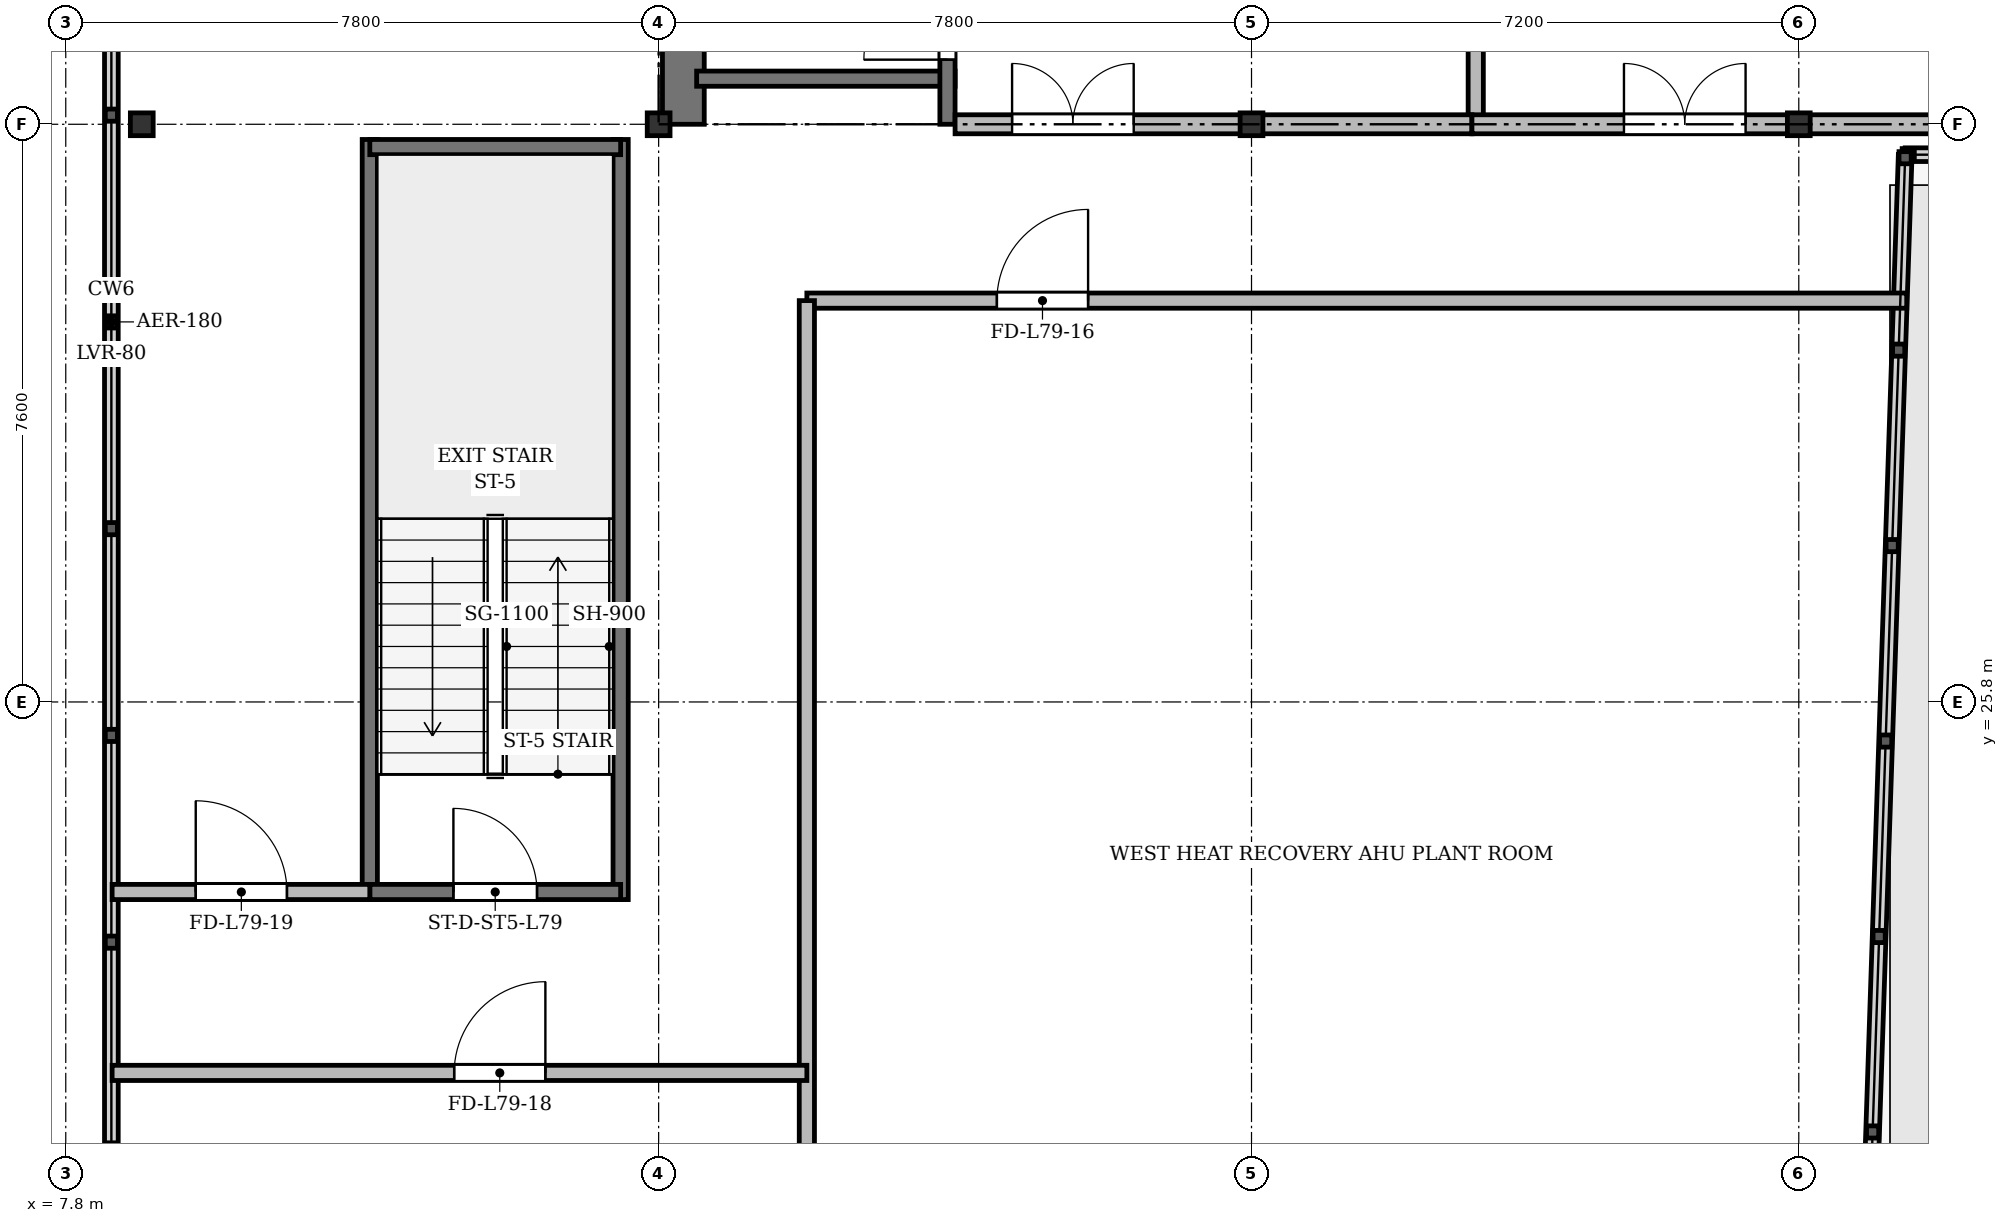
"""IFC4 building model, lengths in metres.
Left out: names, types, materials, properties, quantities, classifications, styles, units other than length and angle.
Written with IfcOpenShell. Run it as: python <this file> out.ifc"""

import sys

from ifc_helpers import new_model, si_unit, direction, frame, frame_2d, origin, origin_2d, place, context, subcontext, project, spatial, rectangle, i_section, extrude, source, transform, mapped, element, fill, save


model = new_model("IFC4")
c1 = context("Model", 3, precision=1e-05, world=origin(), true_north=direction((0.0, 1.0)))
c2 = subcontext(c1, "Body", "Model", "MODEL_VIEW")
j1 = project(units=[si_unit("LENGTHUNIT", "METRE"), si_unit("PLANEANGLEUNIT", "RADIAN")], contexts=[c1])
p1 = place(None, origin())
s1 = spatial("IfcSite", under=j1, at=p1, CompositionType="ELEMENT")
p2 = place(p1, origin())
s2 = spatial("IfcBuilding", under=s1, at=p2, CompositionType="ELEMENT")
p3 = place(p2, frame((0.0, 0.0, 303.5)))
s3 = spatial("IfcBuildingStorey", under=s2, at=p3, CompositionType="ELEMENT", Elevation=303.5)
m1 = source(origin(), c2, "Body", "SweptSolid", [
    extrude(i_section(OverallWidth=0.3, OverallDepth=0.3, WebThickness=0.015, FlangeThickness=0.024, at=origin_2d()), origin(), (0.0, 0.0, 1.0), 4.4),
])
for number, where, z_axis, x_axis in (
    (1, (8.8, 33.4, 0.0), (0.0, 0.0, 1.0), (1.0, 0.0, 0.0)),
    (2, (15.6, 33.4, 0.0), (0.0, 0.0, 1.0), (1.0, 0.0, 0.0)),
    (3, (23.4, 33.4, 0.0), (0.0, 0.0, 1.0), (1.0, 0.0, 0.0)),
    (4, (30.6, 33.4, 0.0), (0.0, 0.0, 1.0), (1.0, 0.0, 0.0)),
):
    element("IfcColumn", number, at=place(p3, frame(where, z_axis=z_axis, x_axis=x_axis)), inside=s3, PredefinedType="COLUMN", context=c2, shape_type="MappedRepresentation", body=[
        mapped(m1, transform((0.0, 0.0, 0.0), x_axis=(1.0, 0.0, 0.0), y_axis=(0.0, 1.0, 0.0), z_axis=(0.0, 0.0, 1.0), scale=1.0)),
    ])
p4 = place(p3, frame((15.925, 33.4, 0.0), z_axis=(0.0, 0.0, 1.0), x_axis=(0.0, 1.0, 0.0)))
e5 = element("IfcWall", 5, at=p4, inside=s3, PredefinedType="SHEAR", context=c2, shape_type="SweptSolid", body=[
    extrude(rectangle(XDim=11.55, YDim=0.55, at=frame_2d((5.775, 0.0))), origin(), (0.0, 0.0, 1.0), 4.1),
])
p5 = place(p3, frame((16.1, 34.0, 0.0), z_axis=(0.0, 0.0, 1.0), x_axis=(1.0, 0.0, 0.0)))
e6 = element("IfcWall", 6, at=p5, inside=s3, PredefinedType="SHEAR", context=c2, shape_type="SweptSolid", body=[
    extrude(rectangle(XDim=3.4, YDim=0.2, at=frame_2d((1.7, 0.0))), origin(), (0.0, 0.0, 1.0), 4.1),
])
p6 = place(p3, frame((19.4, 33.4, 0.0), z_axis=(0.0, 0.0, 1.0), x_axis=(0.0, 1.0, 0.0)))
e7 = element("IfcWall", 7, at=p6, inside=s3, PredefinedType="SHEAR", context=c2, shape_type="SweptSolid", body=[
    extrude(rectangle(XDim=11.1, YDim=0.2, at=frame_2d((5.55, 0.0))), origin(), (0.0, 0.0, 1.0), 4.1),
])
p7 = place(p6, frame((0.85, 0.0, 0.0)))
e8 = element("IfcOpeningElement", 8, at=p7, cuts=e7, PredefinedType="OPENING", context=c2, shape_type="SweptSolid", body=[
    extrude(rectangle(XDim=1.1, YDim=2.15, at=frame_2d((0.55, 1.075))), frame((0.0, 0.11, 0.0), z_axis=(0.0, -1.0, 0.0), x_axis=(1.0, 0.0, 0.0)), (0.0, 0.0, 1.0), 0.22),
])
for number, where, z_axis, x_axis in (
    (9, (11.8, 23.2, 0.0), (0.0, 0.0, 1.0), (0.0, 1.0, 0.0)),
    (10, (15.1, 23.2, 0.0), (0.0, 0.0, 1.0), (0.0, 1.0, 0.0)),
):
    element("IfcWall", number, at=place(p3, frame(where, z_axis=z_axis, x_axis=x_axis)), inside=s3, PredefinedType="SHEAR", context=c2, shape_type="SweptSolid", body=[
        extrude(rectangle(XDim=10.0, YDim=0.2, at=frame_2d((5.0, 0.0))), origin(), (0.0, 0.0, 1.0), 4.1),
    ])
p8 = place(p3, frame((11.8, 33.1, 0.0), z_axis=(0.0, 0.0, 1.0), x_axis=(1.0, 0.0, 0.0)))
e11 = element("IfcWall", 11, at=p8, inside=s3, PredefinedType="SHEAR", context=c2, shape_type="SweptSolid", body=[
    extrude(rectangle(XDim=3.3, YDim=0.2, at=frame_2d((1.65, 0.0))), origin(), (0.0, 0.0, 1.0), 4.1),
])
p9 = place(p3, frame((11.8, 23.3, 0.0), z_axis=(0.0, 0.0, 1.0), x_axis=(1.0, 0.0, 0.0)))
e12 = element("IfcWall", 12, at=p9, inside=s3, PredefinedType="SHEAR", context=c2, shape_type="SweptSolid", body=[
    extrude(rectangle(XDim=3.3, YDim=0.2, at=frame_2d((1.65, 0.0))), origin(), (0.0, 0.0, 1.0), 4.1),
])
p10 = place(p9, frame((1.1, 0.0, 0.0)))
e13 = element("IfcOpeningElement", 13, at=p10, cuts=e12, PredefinedType="OPENING", context=c2, shape_type="SweptSolid", body=[
    extrude(rectangle(XDim=1.1, YDim=2.15, at=frame_2d((0.55, 1.075))), frame((0.0, 0.11, 0.0), z_axis=(0.0, -1.0, 0.0), x_axis=(1.0, 0.0, 0.0)), (0.0, 0.0, 1.0), 0.22),
])
p11 = place(p3, frame((26.35, 33.4, 0.0), z_axis=(0.0, 0.0, 1.0), x_axis=(0.0, 1.0, 0.0)))
e14 = element("IfcWall", 14, at=p11, inside=s3, PredefinedType="SOLIDWALL", context=c2, shape_type="SweptSolid", body=[
    extrude(rectangle(XDim=11.3, YDim=0.2, at=frame_2d((5.65, 0.0))), origin(), (0.0, 0.0, 1.0), 3.6),
])
p12 = place(p3, frame((19.5, 33.4, 0.0), z_axis=(0.0, 0.0, 1.0), x_axis=(1.0, 0.0, 0.0)))
e15 = element("IfcWall", 15, at=p12, inside=s3, PredefinedType="PARTITIONING", context=c2, shape_type="SweptSolid", body=[
    extrude(rectangle(XDim=6.8, YDim=0.25, at=frame_2d((3.4, 0.0))), origin(), (0.0, 0.0, 1.0), 3.6),
])
p13 = place(p12, frame((0.75, 0.0, 0.0)))
e16 = element("IfcOpeningElement", 16, at=p13, cuts=e15, PredefinedType="OPENING", context=c2, shape_type="SweptSolid", body=[
    extrude(rectangle(XDim=1.6, YDim=2.2, at=frame_2d((0.8, 1.1))), frame((0.0, 0.135, 0.0), z_axis=(0.0, -1.0, 0.0), x_axis=(1.0, 0.0, 0.0)), (0.0, 0.0, 1.0), 0.27),
])
p14 = place(p3, frame((26.3, 33.4, 0.0), z_axis=(0.0, 0.0, 1.0), x_axis=(1.0, 0.0, 0.0)))
e17 = element("IfcWall", 17, at=p14, inside=s3, PredefinedType="PARTITIONING", context=c2, shape_type="SweptSolid", body=[
    extrude(rectangle(XDim=20.7, YDim=0.25, at=frame_2d((10.35, 0.0))), origin(), (0.0, 0.0, 1.0), 3.6),
])
p15 = place(p14, frame((2.0, 0.0, 0.0)))
e18 = element("IfcOpeningElement", 18, at=p15, cuts=e17, PredefinedType="OPENING", context=c2, shape_type="SweptSolid", body=[
    extrude(rectangle(XDim=1.6, YDim=2.2, at=frame_2d((0.8, 1.1))), frame((0.0, 0.135, 0.0), z_axis=(0.0, -1.0, 0.0), x_axis=(1.0, 0.0, 0.0)), (0.0, 0.0, 1.0), 0.27),
])
p16 = place(p3, frame((17.55, 31.08, 0.0), z_axis=(0.0, 0.0, 1.0), x_axis=(1.0, 0.0, 0.0)))
e19 = element("IfcWall", 19, at=p16, inside=s3, PredefinedType="PARTITIONING", context=c2, shape_type="SweptSolid", body=[
    extrude(rectangle(XDim=14.47, YDim=0.2, at=frame_2d((7.235, 0.0))), origin(), (0.0, 0.0, 1.0), 3.6),
])
p17 = place(p16, frame((2.5, 0.0, 0.0)))
e20 = element("IfcOpeningElement", 20, at=p17, cuts=e19, PredefinedType="OPENING", context=c2, shape_type="SweptSolid", body=[
    extrude(rectangle(XDim=1.2, YDim=2.15, at=frame_2d((0.6, 1.075))), frame((0.0, 0.11, 0.0), z_axis=(0.0, -1.0, 0.0), x_axis=(1.0, 0.0, 0.0)), (0.0, 0.0, 1.0), 0.22),
])
p18 = place(p3, frame((17.55, 15.01, 0.0), z_axis=(0.0, 0.0, 1.0), x_axis=(0.0, 1.0, 0.0)))
e21 = element("IfcWall", 21, at=p18, inside=s3, PredefinedType="PARTITIONING", context=c2, shape_type="SweptSolid", body=[
    extrude(rectangle(XDim=16.07, YDim=0.2, at=frame_2d((8.035, 0.0))), origin(), (0.0, 0.0, 1.0), 3.6),
])
p19 = place(p3, frame((8.41, 20.92, 0.0), z_axis=(0.0, 0.0, 1.0), x_axis=(1.0, 0.0, 0.0)))
e22 = element("IfcWall", 22, at=p19, inside=s3, PredefinedType="PARTITIONING", context=c2, shape_type="SweptSolid", body=[
    extrude(rectangle(XDim=9.14, YDim=0.2, at=frame_2d((4.57, 0.0))), origin(), (0.0, 0.0, 1.0), 3.6),
])
p20 = place(p19, frame((4.5, 0.0, 0.0)))
e23 = element("IfcOpeningElement", 23, at=p20, cuts=e22, PredefinedType="OPENING", context=c2, shape_type="SweptSolid", body=[
    extrude(rectangle(XDim=1.2, YDim=2.15, at=frame_2d((0.6, 1.075))), frame((0.0, 0.11, 0.0), z_axis=(0.0, -1.0, 0.0), x_axis=(1.0, 0.0, 0.0)), (0.0, 0.0, 1.0), 0.22),
])
p21 = place(p3, frame((8.41, 23.3, 0.0), z_axis=(0.0, 0.0, 1.0), x_axis=(1.0, 0.0, 0.0)))
e24 = element("IfcWall", 24, at=p21, inside=s3, PredefinedType="PARTITIONING", context=c2, shape_type="SweptSolid", body=[
    extrude(rectangle(XDim=3.39, YDim=0.2, at=frame_2d((1.695, 0.0))), origin(), (0.0, 0.0, 1.0), 3.6),
])
p22 = place(p21, frame((1.1, 0.0, 0.0)))
e25 = element("IfcOpeningElement", 25, at=p22, cuts=e24, PredefinedType="OPENING", context=c2, shape_type="SweptSolid", body=[
    extrude(rectangle(XDim=1.2, YDim=2.15, at=frame_2d((0.6, 1.075))), frame((0.0, 0.11, 0.0), z_axis=(0.0, -1.0, 0.0), x_axis=(1.0, 0.0, 0.0)), (0.0, 0.0, 1.0), 0.22),
])
m2 = source(origin(), c2, "Body", "SweptSolid", [
    extrude(rectangle(XDim=1.1, YDim=2.15, at=frame_2d((0.55, 1.075))), frame((0.0, 0.025, 0.0), z_axis=(0.0, -1.0, 0.0), x_axis=(1.0, 0.0, 0.0)), (0.0, 0.0, 1.0), 0.05),
])
p23 = place(p7, origin())
e26 = element("IfcDoor", 26, at=p23, inside=s3, OperationType="SINGLE_SWING_LEFT", PredefinedType="DOOR", context=c2, shape_type="MappedRepresentation", body=[
    mapped(m2, transform((0.0, 0.0, 0.0), x_axis=(1.0, 0.0, 0.0), y_axis=(0.0, 1.0, 0.0), z_axis=(0.0, 0.0, 1.0), scale=1.0)),
])
fill(e8, e26)
p24 = place(p10, origin())
e27 = element("IfcDoor", 27, at=p24, inside=s3, OperationType="SINGLE_SWING_LEFT", PredefinedType="DOOR", context=c2, shape_type="MappedRepresentation", body=[
    mapped(m2, transform((0.0, 0.0, 0.0), x_axis=(1.0, 0.0, 0.0), y_axis=(0.0, 1.0, 0.0), z_axis=(0.0, 0.0, 1.0), scale=1.0)),
])
fill(e13, e27)
m3 = source(origin(), c2, "Body", "SweptSolid", [
    extrude(rectangle(XDim=1.6, YDim=2.2, at=frame_2d((0.8, 1.1))), frame((0.0, 0.025, 0.0), z_axis=(0.0, -1.0, 0.0), x_axis=(1.0, 0.0, 0.0)), (0.0, 0.0, 1.0), 0.05),
])
p25 = place(p13, origin())
e28 = element("IfcDoor", 28, at=p25, inside=s3, OperationType="DOUBLE_DOOR_SINGLE_SWING", PredefinedType="DOOR", context=c2, shape_type="MappedRepresentation", body=[
    mapped(m3, transform((0.0, 0.0, 0.0), x_axis=(1.0, 0.0, 0.0), y_axis=(0.0, 1.0, 0.0), z_axis=(0.0, 0.0, 1.0), scale=1.0)),
])
fill(e16, e28)
p26 = place(p15, origin())
e29 = element("IfcDoor", 29, at=p26, inside=s3, OperationType="DOUBLE_DOOR_SINGLE_SWING", PredefinedType="DOOR", context=c2, shape_type="MappedRepresentation", body=[
    mapped(m3, transform((0.0, 0.0, 0.0), x_axis=(1.0, 0.0, 0.0), y_axis=(0.0, 1.0, 0.0), z_axis=(0.0, 0.0, 1.0), scale=1.0)),
])
fill(e18, e29)
m4 = source(origin(), c2, "Body", "SweptSolid", [
    extrude(rectangle(XDim=1.2, YDim=2.15, at=frame_2d((0.6, 1.075))), frame((0.0, 0.025, 0.0), z_axis=(0.0, -1.0, 0.0), x_axis=(1.0, 0.0, 0.0)), (0.0, 0.0, 1.0), 0.05),
])
p27 = place(p17, origin())
e30 = element("IfcDoor", 30, at=p27, inside=s3, OperationType="SINGLE_SWING_RIGHT", PredefinedType="DOOR", context=c2, shape_type="MappedRepresentation", body=[
    mapped(m4, transform((0.0, 0.0, 0.0), x_axis=(1.0, 0.0, 0.0), y_axis=(0.0, 1.0, 0.0), z_axis=(0.0, 0.0, 1.0), scale=1.0)),
])
fill(e20, e30)
p28 = place(p20, origin())
e31 = element("IfcDoor", 31, at=p28, inside=s3, OperationType="SINGLE_SWING_RIGHT", PredefinedType="DOOR", context=c2, shape_type="MappedRepresentation", body=[
    mapped(m4, transform((0.0, 0.0, 0.0), x_axis=(1.0, 0.0, 0.0), y_axis=(0.0, 1.0, 0.0), z_axis=(0.0, 0.0, 1.0), scale=1.0)),
])
fill(e23, e31)
p29 = place(p22, origin())
e32 = element("IfcDoor", 32, at=p29, inside=s3, OperationType="SINGLE_SWING_LEFT", PredefinedType="DOOR", context=c2, shape_type="MappedRepresentation", body=[
    mapped(m4, transform((0.0, 0.0, 0.0), x_axis=(1.0, 0.0, 0.0), y_axis=(0.0, 1.0, 0.0), z_axis=(0.0, 0.0, 1.0), scale=1.0)),
])
fill(e25, e32)
save(model, sys.argv[1])
